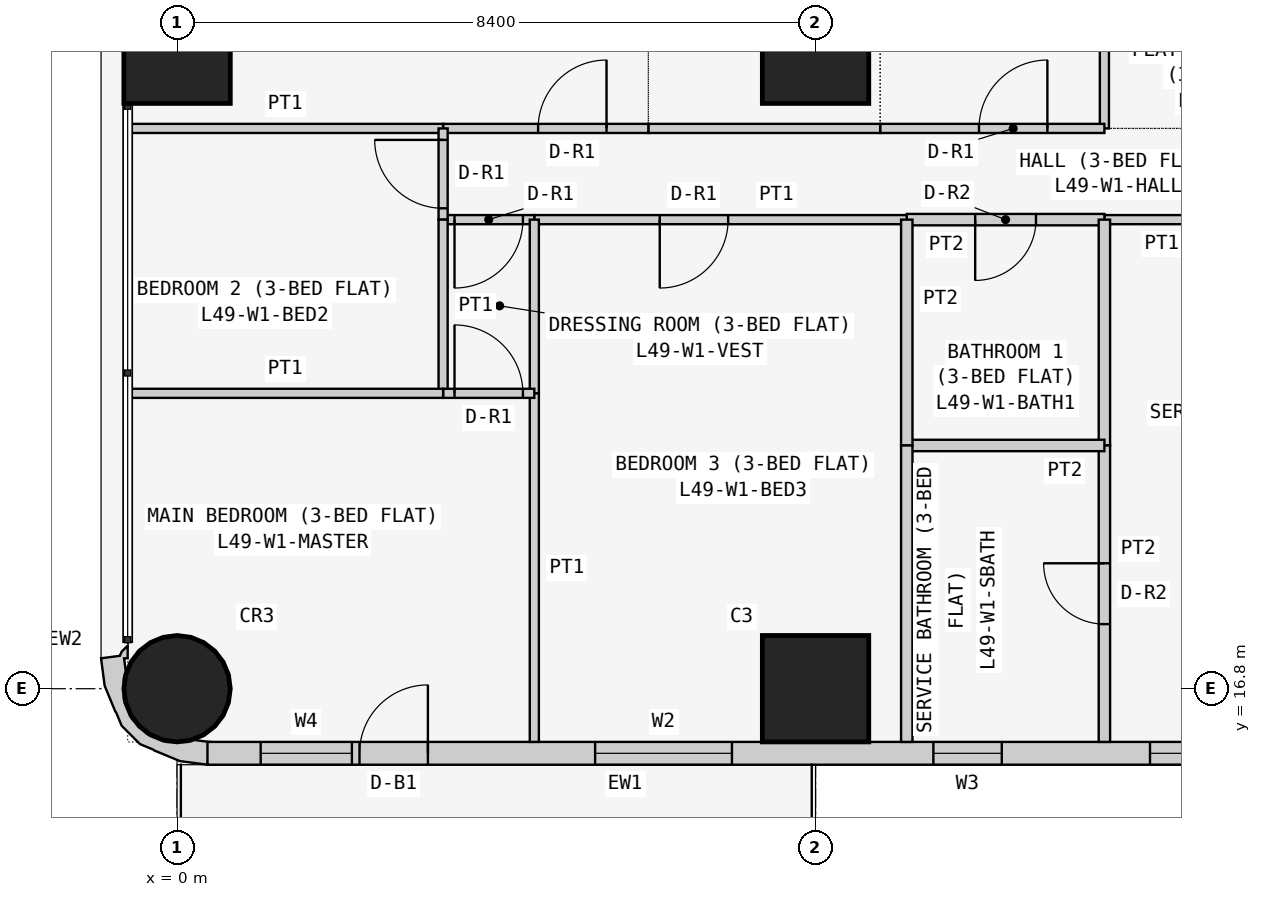
"""IFC4 building model, lengths in metres.
Left out: names, types, materials, properties, quantities, classifications, styles, units other than length and angle.
Written with IfcOpenShell. Run it as: python <this file> out.ifc"""

import sys

from ifc_helpers import new_model, si_unit, direction, frame, frame_2d, origin, origin_2d, place, context, subcontext, project, spatial, polyline, rectangle, circle, outline, extrude, element, fill, save


model = new_model("IFC4")
c1 = context("Model", 3, precision=1e-05, world=origin(), true_north=direction((0.0, 1.0)))
c2 = subcontext(c1, "Body", "Model", "MODEL_VIEW")
j1 = project(units=[si_unit("LENGTHUNIT", "METRE"), si_unit("PLANEANGLEUNIT", "RADIAN")], contexts=[c1])
p1 = place(None, origin())
s1 = spatial("IfcSite", under=j1, at=p1, CompositionType="ELEMENT")
p2 = place(p1, origin())
s2 = spatial("IfcBuilding", under=s1, at=p2, CompositionType="ELEMENT")
p3 = place(p2, frame((0.0, 0.0, 190.5)))
s3 = spatial("IfcBuildingStorey", under=s2, at=p3, CompositionType="ELEMENT", Elevation=190.5)
p4 = place(p3, frame((0.0, 16.8, 0.0), z_axis=(0.0, 0.0, 1.0), x_axis=(1.0, 0.0, 0.0)))
e1 = element("IfcColumn", 1, at=p4, inside=s3, PredefinedType="COLUMN", context=c2, shape_type="SweptSolid", body=[
    extrude(circle(Radius=0.7, at=origin_2d()), origin(), (0.0, 0.0, 1.0), 3.6),
])
for number, where, z_axis, x_axis in (
    (2, (0.0, 25.2, 0.0), (0.0, 0.0, 1.0), (1.0, 0.0, 0.0)),
    (3, (8.4, 16.8, 0.0), (0.0, 0.0, 1.0), (1.0, 0.0, 0.0)),
    (4, (8.4, 25.2, 0.0), (0.0, 0.0, 1.0), (1.0, 0.0, 0.0)),
):
    element("IfcColumn", number, at=place(p3, frame(where, z_axis=z_axis, x_axis=x_axis)), inside=s3, PredefinedType="COLUMN", context=c2, shape_type="SweptSolid", body=[
        extrude(rectangle(XDim=1.4, YDim=1.4, at=origin_2d()), origin(), (0.0, 0.0, 1.0), 3.6),
    ])
p5 = place(p3, frame((0.4, 15.95, 0.0), z_axis=(0.0, 0.0, 1.0), x_axis=(1.0, 0.0, 0.0)))
e5 = element("IfcWall", 5, at=p5, inside=s3, PredefinedType="SOLIDWALL", context=c2, shape_type="SweptSolid", body=[
    extrude(rectangle(XDim=15.7, YDim=0.3, at=frame_2d((7.85, 0.0))), origin(), (0.0, 0.0, 1.0), 3.45),
])
p6 = place(p5, frame((12.4, 0.0, 0.9)))
e6 = element("IfcOpeningElement", 6, at=p6, cuts=e5, PredefinedType="OPENING", context=c2, shape_type="SweptSolid", body=[
    extrude(rectangle(XDim=1.8, YDim=1.5, at=frame_2d((0.9, 0.75))), frame((0.0, 0.16, 0.0), z_axis=(0.0, -1.0, 0.0), x_axis=(1.0, 0.0, 0.0)), (0.0, 0.0, 1.0), 0.32),
])
p7 = place(p5, frame((9.55, 0.0, 1.5)))
e7 = element("IfcOpeningElement", 7, at=p7, cuts=e5, PredefinedType="OPENING", context=c2, shape_type="SweptSolid", body=[
    extrude(rectangle(XDim=0.9, YDim=0.7, at=frame_2d((0.45, 0.35))), frame((0.0, 0.16, 0.0), z_axis=(0.0, -1.0, 0.0), x_axis=(1.0, 0.0, 0.0)), (0.0, 0.0, 1.0), 0.32),
])
p8 = place(p5, frame((5.1, 0.0, 0.9)))
e8 = element("IfcOpeningElement", 8, at=p8, cuts=e5, PredefinedType="OPENING", context=c2, shape_type="SweptSolid", body=[
    extrude(rectangle(XDim=1.8, YDim=1.5, at=frame_2d((0.9, 0.75))), frame((0.0, 0.16, 0.0), z_axis=(0.0, -1.0, 0.0), x_axis=(1.0, 0.0, 0.0)), (0.0, 0.0, 1.0), 0.32),
])
p9 = place(p5, frame((2.0, 0.0, 0.0)))
e9 = element("IfcOpeningElement", 9, at=p9, cuts=e5, PredefinedType="OPENING", context=c2, shape_type="SweptSolid", body=[
    extrude(rectangle(XDim=0.9, YDim=2.4, at=frame_2d((0.45, 1.2))), frame((0.0, 0.16, 0.0), z_axis=(0.0, -1.0, 0.0), x_axis=(1.0, 0.0, 0.0)), (0.0, 0.0, 1.0), 0.32),
])
p10 = place(p5, frame((0.7, 0.0, 0.9)))
e10 = element("IfcOpeningElement", 10, at=p10, cuts=e5, PredefinedType="OPENING", context=c2, shape_type="SweptSolid", body=[
    extrude(rectangle(XDim=1.2, YDim=1.5, at=frame_2d((0.6, 0.75))), frame((0.0, 0.16, 0.0), z_axis=(0.0, -1.0, 0.0), x_axis=(1.0, 0.0, 0.0)), (0.0, 0.0, 1.0), 0.32),
])
p11 = place(p3, frame((-0.588, 17.312, 0.0), z_axis=(0.0, 0.0, 1.0), x_axis=(-0.898030234854, -0.439933741929, 0.0)))
e11 = element("IfcWall", 11, at=p11, inside=s3, PredefinedType="SOLIDWALL", context=c2, shape_type="SweptSolid", body=[
    extrude(outline(polyline([(-0.222, 1.793), (-0.39, 1.541), (-0.372, 1.532), (-0.195, 1.415), (-0.12, 1.41), (0.131, 1.287), (0.315, 1.078), (0.406, 0.814), (0.388, 0.536), (0.265, 0.285), (0.209, 0.236), (0.148, 0.053), (0.105, 0.074), (0.032, -0.076), (0.138, -0.039), (0.182, -0.0), (0.419, -0.08), (0.536, 0.266), (0.559, 0.631), (0.555, 0.651), (0.566, 0.836), (0.456, 1.159), (0.333, 1.298), (0.324, 1.316), (0.082, 1.591), (-0.222, 1.793)])), origin(), (0.0, 0.0, 1.0), 3.45),
])
p12 = place(p3, frame((12.2, 29.4, 0.0), z_axis=(0.0, 0.0, 1.0), x_axis=(0.0, -1.0, 0.0)))
e12 = element("IfcWall", 12, at=p12, inside=s3, PredefinedType="PARTITIONING", context=c2, shape_type="SweptSolid", body=[
    extrude(rectangle(XDim=5.229, YDim=0.12, at=frame_2d((2.615, 0.0))), origin(), (0.0, 0.0, 1.0), 3.45),
])
p13 = place(p3, frame((9.25, 24.171, 0.0), z_axis=(0.0, 0.0, 1.0), x_axis=(1.0, 0.0, 0.0)))
e13 = element("IfcWall", 13, at=p13, inside=s3, PredefinedType="PARTITIONING", context=c2, shape_type="SweptSolid", body=[
    extrude(rectangle(XDim=2.95, YDim=0.12, at=frame_2d((1.475, 0.0))), origin(), (0.0, 0.0, 1.0), 3.45),
])
p14 = place(p13, frame((1.3, 0.0, 0.0)))
e14 = element("IfcOpeningElement", 14, at=p14, cuts=e13, PredefinedType="OPENING", context=c2, shape_type="SweptSolid", body=[
    extrude(rectangle(XDim=0.9, YDim=2.1, at=frame_2d((0.45, 1.05))), frame((0.0, 0.07, 0.0), z_axis=(0.0, -1.0, 0.0), x_axis=(1.0, 0.0, 0.0)), (0.0, 0.0, 1.0), 0.14),
])
p15 = place(p3, frame((6.2, 24.171, 0.0), z_axis=(0.0, 0.0, 1.0), x_axis=(1.0, 0.0, 0.0)))
e15 = element("IfcWall", 15, at=p15, inside=s3, PredefinedType="PARTITIONING", context=c2, shape_type="SweptSolid", body=[
    extrude(rectangle(XDim=3.05, YDim=0.12, at=frame_2d((1.525, 0.0))), origin(), (0.0, 0.0, 1.0), 3.45),
])
p16 = place(p3, frame((3.5, 24.171, 0.0), z_axis=(0.0, 0.0, 1.0), x_axis=(1.0, 0.0, 0.0)))
e16 = element("IfcWall", 16, at=p16, inside=s3, PredefinedType="PARTITIONING", context=c2, shape_type="SweptSolid", body=[
    extrude(rectangle(XDim=2.7, YDim=0.12, at=frame_2d((1.35, 0.0))), origin(), (0.0, 0.0, 1.0), 3.45),
])
p17 = place(p16, frame((1.25, 0.0, 0.0)))
e17 = element("IfcOpeningElement", 17, at=p17, cuts=e16, PredefinedType="OPENING", context=c2, shape_type="SweptSolid", body=[
    extrude(rectangle(XDim=0.9, YDim=2.1, at=frame_2d((0.45, 1.05))), frame((0.0, 0.07, 0.0), z_axis=(0.0, -1.0, 0.0), x_axis=(1.0, 0.0, 0.0)), (0.0, 0.0, 1.0), 0.14),
])
p18 = place(p3, frame((-0.65, 24.171, 0.0), z_axis=(0.0, 0.0, 1.0), x_axis=(1.0, 0.0, 0.0)))
e18 = element("IfcWall", 18, at=p18, inside=s3, PredefinedType="PARTITIONING", context=c2, shape_type="SweptSolid", body=[
    extrude(rectangle(XDim=4.15, YDim=0.12, at=frame_2d((2.075, 0.0))), origin(), (0.0, 0.0, 1.0), 3.45),
])
p19 = place(p3, frame((12.2, 22.971, 0.0), z_axis=(0.0, 0.0, 1.0), x_axis=(1.0, 0.0, 0.0)))
e19 = element("IfcWall", 19, at=p19, inside=s3, PredefinedType="PARTITIONING", context=c2, shape_type="SweptSolid", body=[
    extrude(rectangle(XDim=3.775, YDim=0.12, at=frame_2d((1.888, 0.0))), origin(), (0.0, 0.0, 1.0), 3.45),
])
p20 = place(p19, frame((1.35, 0.0, 0.0)))
e20 = element("IfcOpeningElement", 20, at=p20, cuts=e19, PredefinedType="OPENING", context=c2, shape_type="SweptSolid", body=[
    extrude(rectangle(XDim=0.9, YDim=2.1, at=frame_2d((0.45, 1.05))), frame((0.0, 0.07, 0.0), z_axis=(0.0, -1.0, 0.0), x_axis=(1.0, 0.0, 0.0)), (0.0, 0.0, 1.0), 0.14),
])
p21 = place(p3, frame((9.6, 22.971, 0.0), z_axis=(0.0, 0.0, 1.0), x_axis=(1.0, 0.0, 0.0)))
e21 = element("IfcWall", 21, at=p21, inside=s3, PredefinedType="PARTITIONING", context=c2, shape_type="SweptSolid", body=[
    extrude(rectangle(XDim=2.6, YDim=0.15, at=frame_2d((1.3, 0.0))), origin(), (0.0, 0.0, 1.0), 3.45),
])
p22 = place(p21, frame((0.9, 0.0, 0.0)))
e22 = element("IfcOpeningElement", 22, at=p22, cuts=e21, PredefinedType="OPENING", context=c2, shape_type="SweptSolid", body=[
    extrude(rectangle(XDim=0.8, YDim=2.1, at=frame_2d((0.4, 1.05))), frame((0.0, 0.085, 0.0), z_axis=(0.0, -1.0, 0.0), x_axis=(1.0, 0.0, 0.0)), (0.0, 0.0, 1.0), 0.17),
])
p23 = place(p3, frame((4.7, 22.971, 0.0), z_axis=(0.0, 0.0, 1.0), x_axis=(1.0, 0.0, 0.0)))
e23 = element("IfcWall", 23, at=p23, inside=s3, PredefinedType="PARTITIONING", context=c2, shape_type="SweptSolid", body=[
    extrude(rectangle(XDim=4.9, YDim=0.12, at=frame_2d((2.45, 0.0))), origin(), (0.0, 0.0, 1.0), 3.45),
])
p24 = place(p23, frame((1.65, 0.0, 0.0)))
e24 = element("IfcOpeningElement", 24, at=p24, cuts=e23, PredefinedType="OPENING", context=c2, shape_type="SweptSolid", body=[
    extrude(rectangle(XDim=0.9, YDim=2.1, at=frame_2d((0.45, 1.05))), frame((0.0, 0.07, 0.0), z_axis=(0.0, -1.0, 0.0), x_axis=(1.0, 0.0, 0.0)), (0.0, 0.0, 1.0), 0.14),
])
p25 = place(p3, frame((3.5, 22.971, 0.0), z_axis=(0.0, 0.0, 1.0), x_axis=(1.0, 0.0, 0.0)))
e25 = element("IfcWall", 25, at=p25, inside=s3, PredefinedType="PARTITIONING", context=c2, shape_type="SweptSolid", body=[
    extrude(rectangle(XDim=1.2, YDim=0.12, at=frame_2d((0.6, 0.0))), origin(), (0.0, 0.0, 1.0), 3.45),
])
p26 = place(p25, frame((0.15, 0.0, 0.0)))
e26 = element("IfcOpeningElement", 26, at=p26, cuts=e25, PredefinedType="OPENING", context=c2, shape_type="SweptSolid", body=[
    extrude(rectangle(XDim=0.9, YDim=2.1, at=frame_2d((0.45, 1.05))), frame((0.0, 0.07, 0.0), z_axis=(0.0, -1.0, 0.0), x_axis=(1.0, 0.0, 0.0)), (0.0, 0.0, 1.0), 0.14),
])
p27 = place(p3, frame((3.5, 24.171, 0.0), z_axis=(0.0, 0.0, 1.0), x_axis=(0.0, -1.0, 0.0)))
e27 = element("IfcWall", 27, at=p27, inside=s3, PredefinedType="PARTITIONING", context=c2, shape_type="SweptSolid", body=[
    extrude(rectangle(XDim=1.2, YDim=0.12, at=frame_2d((0.6, 0.0))), origin(), (0.0, 0.0, 1.0), 3.45),
])
p28 = place(p27, frame((0.151, 0.0, 0.0)))
e28 = element("IfcOpeningElement", 28, at=p28, cuts=e27, PredefinedType="OPENING", context=c2, shape_type="SweptSolid", body=[
    extrude(rectangle(XDim=0.9, YDim=2.1, at=frame_2d((0.45, 1.05))), frame((0.0, 0.07, 0.0), z_axis=(0.0, -1.0, 0.0), x_axis=(1.0, 0.0, 0.0)), (0.0, 0.0, 1.0), 0.14),
])
p29 = place(p3, frame((12.2, 22.971, 0.0), z_axis=(0.0, 0.0, 1.0), x_axis=(0.0, -1.0, 0.0)))
e29 = element("IfcWall", 29, at=p29, inside=s3, PredefinedType="PARTITIONING", context=c2, shape_type="SweptSolid", body=[
    extrude(rectangle(XDim=2.971, YDim=0.15, at=frame_2d((1.485, 0.0))), origin(), (0.0, 0.0, 1.0), 3.45),
])
p30 = place(p3, frame((12.2, 20.0, 0.0), z_axis=(0.0, 0.0, 1.0), x_axis=(0.0, -1.0, 0.0)))
e30 = element("IfcWall", 30, at=p30, inside=s3, PredefinedType="PARTITIONING", context=c2, shape_type="SweptSolid", body=[
    extrude(rectangle(XDim=3.9, YDim=0.15, at=frame_2d((1.95, 0.0))), origin(), (0.0, 0.0, 1.0), 3.45),
])
p31 = place(p30, frame((1.55, 0.0, 0.0)))
e31 = element("IfcOpeningElement", 31, at=p31, cuts=e30, PredefinedType="OPENING", context=c2, shape_type="SweptSolid", body=[
    extrude(rectangle(XDim=0.8, YDim=2.1, at=frame_2d((0.4, 1.05))), frame((0.0, 0.085, 0.0), z_axis=(0.0, -1.0, 0.0), x_axis=(1.0, 0.0, 0.0)), (0.0, 0.0, 1.0), 0.17),
])
p32 = place(p3, frame((9.6, 20.0, 0.0), z_axis=(0.0, 0.0, 1.0), x_axis=(1.0, 0.0, 0.0)))
e32 = element("IfcWall", 32, at=p32, inside=s3, PredefinedType="PARTITIONING", context=c2, shape_type="SweptSolid", body=[
    extrude(rectangle(XDim=2.6, YDim=0.15, at=frame_2d((1.3, 0.0))), origin(), (0.0, 0.0, 1.0), 3.45),
])
p33 = place(p3, frame((9.6, 22.971, 0.0), z_axis=(0.0, 0.0, 1.0), x_axis=(0.0, -1.0, 0.0)))
e33 = element("IfcWall", 33, at=p33, inside=s3, PredefinedType="PARTITIONING", context=c2, shape_type="SweptSolid", body=[
    extrude(rectangle(XDim=2.971, YDim=0.15, at=frame_2d((1.485, 0.0))), origin(), (0.0, 0.0, 1.0), 3.45),
])
p34 = place(p3, frame((9.6, 20.0, 0.0), z_axis=(0.0, 0.0, 1.0), x_axis=(0.0, -1.0, 0.0)))
e34 = element("IfcWall", 34, at=p34, inside=s3, PredefinedType="PARTITIONING", context=c2, shape_type="SweptSolid", body=[
    extrude(rectangle(XDim=3.9, YDim=0.15, at=frame_2d((1.95, 0.0))), origin(), (0.0, 0.0, 1.0), 3.45),
])
p35 = place(p3, frame((4.7, 22.971, 0.0), z_axis=(0.0, 0.0, 1.0), x_axis=(0.0, -1.0, 0.0)))
e35 = element("IfcWall", 35, at=p35, inside=s3, PredefinedType="PARTITIONING", context=c2, shape_type="SweptSolid", body=[
    extrude(rectangle(XDim=2.285, YDim=0.12, at=frame_2d((1.143, 0.0))), origin(), (0.0, 0.0, 1.0), 3.45),
])
p36 = place(p3, frame((4.7, 20.686, 0.0), z_axis=(0.0, 0.0, 1.0), x_axis=(0.0, -1.0, 0.0)))
e36 = element("IfcWall", 36, at=p36, inside=s3, PredefinedType="PARTITIONING", context=c2, shape_type="SweptSolid", body=[
    extrude(rectangle(XDim=4.586, YDim=0.12, at=frame_2d((2.293, 0.0))), origin(), (0.0, 0.0, 1.0), 3.45),
])
p37 = place(p3, frame((3.5, 22.971, 0.0), z_axis=(0.0, 0.0, 1.0), x_axis=(0.0, -1.0, 0.0)))
e37 = element("IfcWall", 37, at=p37, inside=s3, PredefinedType="PARTITIONING", context=c2, shape_type="SweptSolid", body=[
    extrude(rectangle(XDim=2.285, YDim=0.12, at=frame_2d((1.143, 0.0))), origin(), (0.0, 0.0, 1.0), 3.45),
])
p38 = place(p3, frame((3.5, 20.686, 0.0), z_axis=(0.0, 0.0, 1.0), x_axis=(1.0, 0.0, 0.0)))
e38 = element("IfcWall", 38, at=p38, inside=s3, PredefinedType="PARTITIONING", context=c2, shape_type="SweptSolid", body=[
    extrude(rectangle(XDim=1.2, YDim=0.12, at=frame_2d((0.6, 0.0))), origin(), (0.0, 0.0, 1.0), 3.45),
])
p39 = place(p38, frame((0.15, 0.0, 0.0)))
e39 = element("IfcOpeningElement", 39, at=p39, cuts=e38, PredefinedType="OPENING", context=c2, shape_type="SweptSolid", body=[
    extrude(rectangle(XDim=0.9, YDim=2.1, at=frame_2d((0.45, 1.05))), frame((0.0, 0.07, 0.0), z_axis=(0.0, -1.0, 0.0), x_axis=(1.0, 0.0, 0.0)), (0.0, 0.0, 1.0), 0.14),
])
p40 = place(p3, frame((-0.65, 20.686, 0.0), z_axis=(0.0, 0.0, 1.0), x_axis=(1.0, 0.0, 0.0)))
e40 = element("IfcWall", 40, at=p40, inside=s3, PredefinedType="PARTITIONING", context=c2, shape_type="SweptSolid", body=[
    extrude(rectangle(XDim=4.15, YDim=0.12, at=frame_2d((2.075, 0.0))), origin(), (0.0, 0.0, 1.0), 3.45),
])
p41 = place(p6, origin())
e41 = element("IfcWindow", 41, at=p41, inside=s3, PartitioningType="SINGLE_PANEL", PredefinedType="WINDOW", context=c2, shape_type="SweptSolid", body=[
    extrude(rectangle(XDim=1.8, YDim=1.5, at=frame_2d((0.9, 0.75))), frame((0.0, 0.03, 0.0), z_axis=(0.0, -1.0, 0.0), x_axis=(1.0, 0.0, 0.0)), (0.0, 0.0, 1.0), 0.06),
])
fill(e6, e41)
p42 = place(p7, origin())
e42 = element("IfcWindow", 42, at=p42, inside=s3, PartitioningType="SINGLE_PANEL", PredefinedType="WINDOW", context=c2, shape_type="SweptSolid", body=[
    extrude(rectangle(XDim=0.9, YDim=0.7, at=frame_2d((0.45, 0.35))), frame((0.0, 0.03, 0.0), z_axis=(0.0, -1.0, 0.0), x_axis=(1.0, 0.0, 0.0)), (0.0, 0.0, 1.0), 0.06),
])
fill(e7, e42)
p43 = place(p8, origin())
e43 = element("IfcWindow", 43, at=p43, inside=s3, PartitioningType="SINGLE_PANEL", PredefinedType="WINDOW", context=c2, shape_type="SweptSolid", body=[
    extrude(rectangle(XDim=1.8, YDim=1.5, at=frame_2d((0.9, 0.75))), frame((0.0, 0.03, 0.0), z_axis=(0.0, -1.0, 0.0), x_axis=(1.0, 0.0, 0.0)), (0.0, 0.0, 1.0), 0.06),
])
fill(e8, e43)
p44 = place(p9, origin())
e44 = element("IfcDoor", 44, at=p44, inside=s3, OperationType="SINGLE_SWING_RIGHT", PredefinedType="DOOR", context=c2, shape_type="SweptSolid", body=[
    extrude(rectangle(XDim=0.9, YDim=2.4, at=frame_2d((0.45, 1.2))), frame((0.0, 0.025, 0.0), z_axis=(0.0, -1.0, 0.0), x_axis=(1.0, 0.0, 0.0)), (0.0, 0.0, 1.0), 0.05),
])
fill(e9, e44)
p45 = place(p10, origin())
e45 = element("IfcWindow", 45, at=p45, inside=s3, PartitioningType="SINGLE_PANEL", PredefinedType="WINDOW", context=c2, shape_type="SweptSolid", body=[
    extrude(rectangle(XDim=1.2, YDim=1.5, at=frame_2d((0.6, 0.75))), frame((0.0, 0.03, 0.0), z_axis=(0.0, -1.0, 0.0), x_axis=(1.0, 0.0, 0.0)), (0.0, 0.0, 1.0), 0.06),
])
fill(e10, e45)
p46 = place(p14, origin())
e46 = element("IfcDoor", 46, at=p46, inside=s3, OperationType="SINGLE_SWING_RIGHT", PredefinedType="DOOR", context=c2, shape_type="SweptSolid", body=[
    extrude(rectangle(XDim=0.9, YDim=2.1, at=frame_2d((0.45, 1.05))), frame((0.0, 0.025, 0.0), z_axis=(0.0, -1.0, 0.0), x_axis=(1.0, 0.0, 0.0)), (0.0, 0.0, 1.0), 0.05),
])
fill(e14, e46)
p47 = place(p17, origin())
e47 = element("IfcDoor", 47, at=p47, inside=s3, OperationType="SINGLE_SWING_RIGHT", PredefinedType="DOOR", context=c2, shape_type="SweptSolid", body=[
    extrude(rectangle(XDim=0.9, YDim=2.1, at=frame_2d((0.45, 1.05))), frame((0.0, 0.025, 0.0), z_axis=(0.0, -1.0, 0.0), x_axis=(1.0, 0.0, 0.0)), (0.0, 0.0, 1.0), 0.05),
])
fill(e17, e47)
p48 = place(p31, frame((0.8, 0.0, 0.0), z_axis=(0.0, 0.0, 1.0), x_axis=(-1.0, 0.0, 0.0)))
e48 = element("IfcDoor", 48, at=p48, inside=s3, OperationType="SINGLE_SWING_RIGHT", PredefinedType="DOOR", context=c2, shape_type="SweptSolid", body=[
    extrude(rectangle(XDim=0.8, YDim=2.1, at=frame_2d((0.4, 1.05))), frame((0.0, 0.025, 0.0), z_axis=(0.0, -1.0, 0.0), x_axis=(1.0, 0.0, 0.0)), (0.0, 0.0, 1.0), 0.05),
])
fill(e31, e48)
p49 = place(p22, frame((0.8, 0.0, 0.0), z_axis=(0.0, 0.0, 1.0), x_axis=(-1.0, 0.0, 0.0)))
e49 = element("IfcDoor", 49, at=p49, inside=s3, OperationType="SINGLE_SWING_RIGHT", PredefinedType="DOOR", context=c2, shape_type="SweptSolid", body=[
    extrude(rectangle(XDim=0.8, YDim=2.1, at=frame_2d((0.4, 1.05))), frame((0.0, 0.025, 0.0), z_axis=(0.0, -1.0, 0.0), x_axis=(1.0, 0.0, 0.0)), (0.0, 0.0, 1.0), 0.05),
])
fill(e22, e49)
p50 = place(p24, frame((0.9, 0.0, 0.0), z_axis=(0.0, 0.0, 1.0), x_axis=(-1.0, 0.0, 0.0)))
e50 = element("IfcDoor", 50, at=p50, inside=s3, OperationType="SINGLE_SWING_RIGHT", PredefinedType="DOOR", context=c2, shape_type="SweptSolid", body=[
    extrude(rectangle(XDim=0.9, YDim=2.1, at=frame_2d((0.45, 1.05))), frame((0.0, 0.025, 0.0), z_axis=(0.0, -1.0, 0.0), x_axis=(1.0, 0.0, 0.0)), (0.0, 0.0, 1.0), 0.05),
])
fill(e24, e50)
p51 = place(p26, frame((0.9, 0.0, 0.0), z_axis=(0.0, 0.0, 1.0), x_axis=(-1.0, 0.0, 0.0)))
e51 = element("IfcDoor", 51, at=p51, inside=s3, OperationType="SINGLE_SWING_RIGHT", PredefinedType="DOOR", context=c2, shape_type="SweptSolid", body=[
    extrude(rectangle(XDim=0.9, YDim=2.1, at=frame_2d((0.45, 1.05))), frame((0.0, 0.025, 0.0), z_axis=(0.0, -1.0, 0.0), x_axis=(1.0, 0.0, 0.0)), (0.0, 0.0, 1.0), 0.05),
])
fill(e26, e51)
p52 = place(p39, origin())
e52 = element("IfcDoor", 52, at=p52, inside=s3, OperationType="SINGLE_SWING_LEFT", PredefinedType="DOOR", context=c2, shape_type="SweptSolid", body=[
    extrude(rectangle(XDim=0.9, YDim=2.1, at=frame_2d((0.45, 1.05))), frame((0.0, 0.025, 0.0), z_axis=(0.0, -1.0, 0.0), x_axis=(1.0, 0.0, 0.0)), (0.0, 0.0, 1.0), 0.05),
])
fill(e39, e52)
p53 = place(p28, frame((0.9, 0.0, 0.0), z_axis=(0.0, 0.0, 1.0), x_axis=(-1.0, 0.0, 0.0)))
e53 = element("IfcDoor", 53, at=p53, inside=s3, OperationType="SINGLE_SWING_RIGHT", PredefinedType="DOOR", context=c2, shape_type="SweptSolid", body=[
    extrude(rectangle(XDim=0.9, YDim=2.1, at=frame_2d((0.45, 1.05))), frame((0.0, 0.025, 0.0), z_axis=(0.0, -1.0, 0.0), x_axis=(1.0, 0.0, 0.0)), (0.0, 0.0, 1.0), 0.05),
])
fill(e28, e53)
save(model, sys.argv[1])
